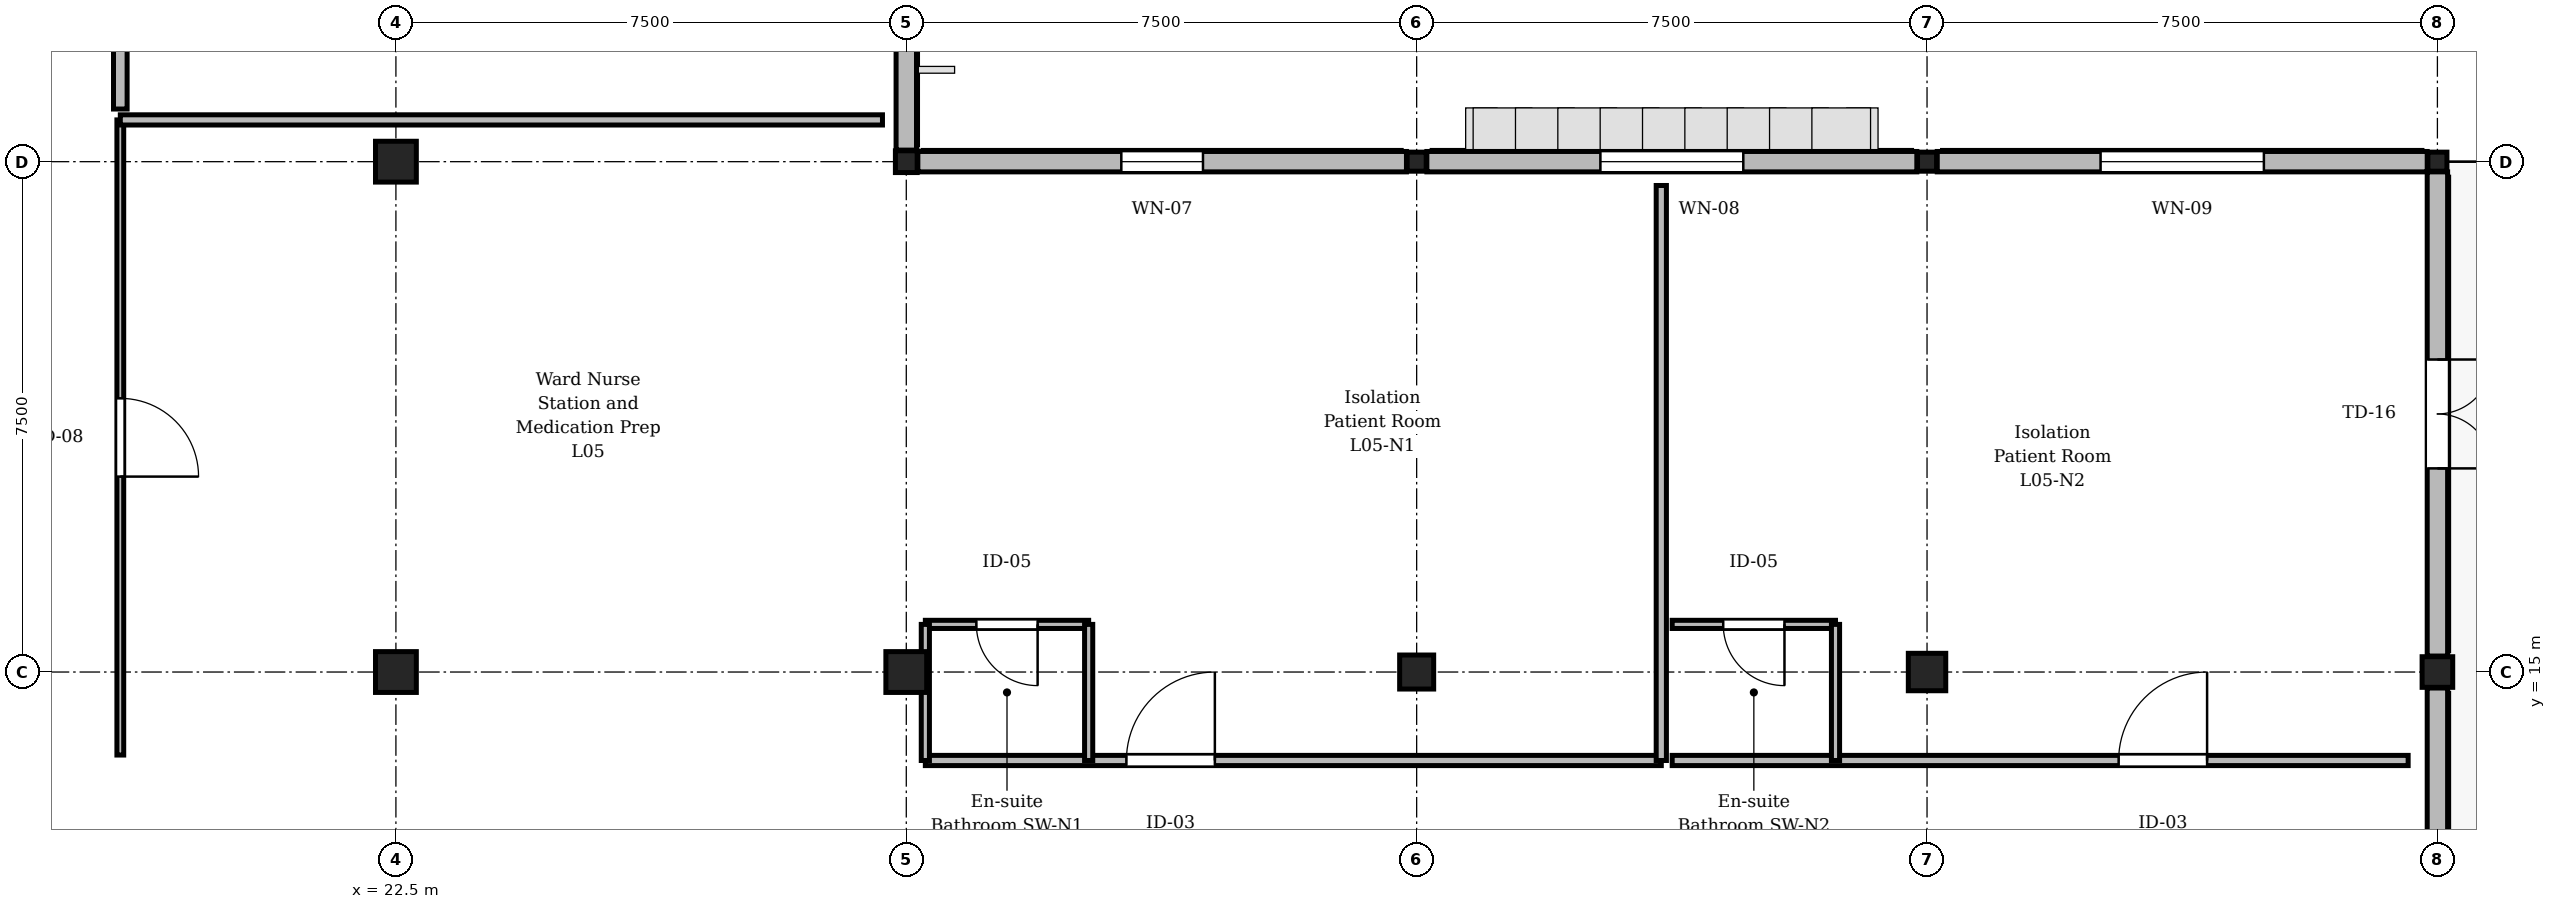
"""IFC4 building model, lengths in metres.
Left out: names, types, materials, properties, quantities, classifications, styles, units other than length and angle.
Written with IfcOpenShell. Run it as: python <this file> out.ifc"""

import sys

from ifc_helpers import new_model, si_unit, direction, frame, frame_2d, origin, origin_2d, place, context, subcontext, project, spatial, rectangle, circle, extrude, element, fill, save


model = new_model("IFC4")
c1 = context("Model", 3, precision=1e-05, world=origin(), true_north=direction((0.0, 1.0)))
c2 = subcontext(c1, "Body", "Model", "MODEL_VIEW")
j1 = project(units=[si_unit("LENGTHUNIT", "METRE"), si_unit("PLANEANGLEUNIT", "RADIAN")], contexts=[c1])
p1 = place(None, origin())
s1 = spatial("IfcSite", under=j1, at=p1, CompositionType="ELEMENT")
p2 = place(p1, origin())
s2 = spatial("IfcBuilding", under=s1, at=p2, CompositionType="ELEMENT")
p3 = place(p2, frame((0.0, 0.0, 21.9)))
s3 = spatial("IfcBuildingStorey", under=s2, at=p3, CompositionType="ELEMENT", Elevation=21.9)
p4 = place(p3, frame((22.5, 15.0, 0.0), z_axis=(0.0, 0.0, 1.0), x_axis=(1.0, 0.0, 0.0)))
e1 = element("IfcColumn", 1, at=p4, inside=s3, PredefinedType="COLUMN", context=c2, shape_type="SweptSolid", body=[
    extrude(rectangle(XDim=0.6, YDim=0.6, at=origin_2d()), origin(), (0.0, 0.0, 1.0), 4.05),
])
for number, where, z_axis, x_axis in (
    (2, (22.5, 22.5, 0.0), (0.0, 0.0, 1.0), (1.0, 0.0, 0.0)),
    (3, (30.0, 15.0, 0.0), (0.0, 0.0, 1.0), (1.0, 0.0, 0.0)),
):
    element("IfcColumn", number, at=place(p3, frame(where, z_axis=z_axis, x_axis=x_axis)), inside=s3, PredefinedType="COLUMN", context=c2, shape_type="SweptSolid", body=[
        extrude(circle(Radius=0.3, at=origin_2d()), origin(), (0.0, 0.0, 1.0), 4.05),
    ])
p5 = place(p3, frame((30.0, 22.5, 0.0), z_axis=(0.0, 0.0, 1.0), x_axis=(1.0, 0.0, 0.0)))
e4 = element("IfcColumn", 4, at=p5, inside=s3, PredefinedType="COLUMN", context=c2, shape_type="SweptSolid", body=[
    extrude(rectangle(XDim=0.32, YDim=0.32, at=origin_2d()), origin(), (0.0, 0.0, 1.0), 4.05),
])
p6 = place(p3, frame((37.5, 15.0, 0.0), z_axis=(0.0, 0.0, 1.0), x_axis=(1.0, 0.0, 0.0)))
e5 = element("IfcColumn", 5, at=p6, inside=s3, PredefinedType="COLUMN", context=c2, shape_type="SweptSolid", body=[
    extrude(rectangle(XDim=0.5, YDim=0.5, at=origin_2d()), origin(), (0.0, 0.0, 1.0), 4.05),
])
p7 = place(p3, frame((37.5, 22.5, 0.0), z_axis=(0.0, 0.0, 1.0), x_axis=(1.0, 0.0, 0.0)))
e6 = element("IfcColumn", 6, at=p7, inside=s3, PredefinedType="COLUMN", context=c2, shape_type="SweptSolid", body=[
    extrude(rectangle(XDim=0.28, YDim=0.28, at=origin_2d()), origin(), (0.0, 0.0, 1.0), 4.05),
])
p8 = place(p3, frame((45.0, 15.0, 0.0), z_axis=(0.0, 0.0, 1.0), x_axis=(1.0, 0.0, 0.0)))
e7 = element("IfcColumn", 7, at=p8, inside=s3, PredefinedType="COLUMN", context=c2, shape_type="SweptSolid", body=[
    extrude(rectangle(XDim=0.55, YDim=0.55, at=origin_2d()), origin(), (0.0, 0.0, 1.0), 4.05),
])
p9 = place(p3, frame((45.0, 22.5, 0.0), z_axis=(0.0, 0.0, 1.0), x_axis=(1.0, 0.0, 0.0)))
e8 = element("IfcColumn", 8, at=p9, inside=s3, PredefinedType="COLUMN", context=c2, shape_type="SweptSolid", body=[
    extrude(rectangle(XDim=0.28, YDim=0.28, at=origin_2d()), origin(), (0.0, 0.0, 1.0), 4.05),
])
p10 = place(p3, frame((52.5, 15.0, 0.0), z_axis=(0.0, 0.0, 1.0), x_axis=(1.0, 0.0, 0.0)))
e9 = element("IfcColumn", 9, at=p10, inside=s3, PredefinedType="COLUMN", context=c2, shape_type="SweptSolid", body=[
    extrude(rectangle(XDim=0.45, YDim=0.45, at=origin_2d()), origin(), (0.0, 0.0, 1.0), 4.05),
])
p11 = place(p3, frame((52.5, 22.5, 0.0), z_axis=(0.0, 0.0, 1.0), x_axis=(1.0, 0.0, 0.0)))
e10 = element("IfcColumn", 10, at=p11, inside=s3, PredefinedType="COLUMN", context=c2, shape_type="SweptSolid", body=[
    extrude(rectangle(XDim=0.28, YDim=0.28, at=origin_2d()), origin(), (0.0, 0.0, 1.0), 4.05),
])
p12 = place(p3, frame((30.0, 31.33, 0.0), z_axis=(0.0, 0.0, 1.0), x_axis=(0.0, -1.0, 0.0)))
e11 = element("IfcWall", 11, at=p12, inside=s3, PredefinedType="STANDARD", context=c2, shape_type="SweptSolid", body=[
    extrude(rectangle(XDim=8.66, YDim=0.3, at=frame_2d((4.33, 0.0))), origin(), (0.0, 0.0, 1.0), 3.22),
])
p13 = place(p12, frame((3.73, 0.0, 0.9)))
e12 = element("IfcOpeningElement", 12, at=p13, cuts=e11, PredefinedType="OPENING", context=c2, shape_type="SweptSolid", body=[
    extrude(rectangle(XDim=1.2, YDim=2.04, at=frame_2d((0.6, 1.02))), frame((0.0, 0.16, 0.0), z_axis=(0.0, -1.0, 0.0), x_axis=(1.0, 0.0, 0.0)), (0.0, 0.0, 1.0), 0.32),
])
p14 = place(p3, frame((30.17, 22.5, 0.0), z_axis=(0.0, 0.0, 1.0), x_axis=(1.0, 0.0, 0.0)))
e13 = element("IfcWall", 13, at=p14, inside=s3, PredefinedType="STANDARD", context=c2, shape_type="SweptSolid", body=[
    extrude(rectangle(XDim=7.18, YDim=0.3, at=frame_2d((3.59, 0.0))), origin(), (0.0, 0.0, 1.0), 3.17),
])
p15 = place(p14, frame((2.99, 0.0, 0.9)))
e14 = element("IfcOpeningElement", 14, at=p15, cuts=e13, PredefinedType="OPENING", context=c2, shape_type="SweptSolid", body=[
    extrude(rectangle(XDim=1.2, YDim=1.99, at=frame_2d((0.6, 0.995))), frame((0.0, 0.16, 0.0), z_axis=(0.0, -1.0, 0.0), x_axis=(1.0, 0.0, 0.0)), (0.0, 0.0, 1.0), 0.32),
])
p16 = place(p3, frame((37.65, 22.5, 0.0), z_axis=(0.0, 0.0, 1.0), x_axis=(1.0, 0.0, 0.0)))
e15 = element("IfcWall", 15, at=p16, inside=s3, PredefinedType="STANDARD", context=c2, shape_type="SweptSolid", body=[
    extrude(rectangle(XDim=7.2, YDim=0.3, at=frame_2d((3.6, 0.0))), origin(), (0.0, 0.0, 1.0), 3.17),
])
p17 = place(p16, frame((2.55, 0.0, 0.9)))
e16 = element("IfcOpeningElement", 16, at=p17, cuts=e15, PredefinedType="OPENING", context=c2, shape_type="SweptSolid", body=[
    extrude(rectangle(XDim=2.1, YDim=1.99, at=frame_2d((1.05, 0.995))), frame((0.0, 0.16, 0.0), z_axis=(0.0, -1.0, 0.0), x_axis=(1.0, 0.0, 0.0)), (0.0, 0.0, 1.0), 0.32),
])
p18 = place(p3, frame((52.5, 14.765, 0.0), z_axis=(0.0, 0.0, 1.0), x_axis=(0.0, -1.0, 0.0)))
e17 = element("IfcWall", 17, at=p18, inside=s3, PredefinedType="STANDARD", context=c2, shape_type="SweptSolid", body=[
    extrude(rectangle(XDim=7.03, YDim=0.3, at=frame_2d((3.515, 0.0))), origin(), (0.0, 0.0, 1.0), 3.17),
])
p19 = place(p18, frame((2.715, 0.0, 0.0)))
e18 = element("IfcOpeningElement", 18, at=p19, cuts=e17, PredefinedType="OPENING", context=c2, shape_type="SweptSolid", body=[
    extrude(rectangle(XDim=1.6, YDim=2.35, at=frame_2d((0.8, 1.175))), frame((0.0, 0.16, 0.0), z_axis=(0.0, -1.0, 0.0), x_axis=(1.0, 0.0, 0.0)), (0.0, 0.0, 1.0), 0.32),
])
p20 = place(p3, frame((45.15, 22.5, 0.0), z_axis=(0.0, 0.0, 1.0), x_axis=(1.0, 0.0, 0.0)))
e19 = element("IfcWall", 19, at=p20, inside=s3, PredefinedType="STANDARD", context=c2, shape_type="SweptSolid", body=[
    extrude(rectangle(XDim=7.2, YDim=0.3, at=frame_2d((3.6, 0.0))), origin(), (0.0, 0.0, 1.0), 3.17),
])
p21 = place(p20, frame((2.4, 0.0, 0.9)))
e20 = element("IfcOpeningElement", 20, at=p21, cuts=e19, PredefinedType="OPENING", context=c2, shape_type="SweptSolid", body=[
    extrude(rectangle(XDim=2.4, YDim=1.99, at=frame_2d((1.2, 0.995))), frame((0.0, 0.16, 0.0), z_axis=(0.0, -1.0, 0.0), x_axis=(1.0, 0.0, 0.0)), (0.0, 0.0, 1.0), 0.32),
])
p22 = place(p3, frame((52.5, 22.35, 0.0), z_axis=(0.0, 0.0, 1.0), x_axis=(0.0, -1.0, 0.0)))
e21 = element("IfcWall", 21, at=p22, inside=s3, PredefinedType="STANDARD", context=c2, shape_type="SweptSolid", body=[
    extrude(rectangle(XDim=7.115, YDim=0.3, at=frame_2d((3.558, 0.0))), origin(), (0.0, 0.0, 1.0), 3.17),
])
p23 = place(p22, frame((2.758, 0.0, 0.0)))
e22 = element("IfcOpeningElement", 22, at=p23, cuts=e21, PredefinedType="OPENING", context=c2, shape_type="SweptSolid", body=[
    extrude(rectangle(XDim=1.6, YDim=2.35, at=frame_2d((0.8, 1.175))), frame((0.0, 0.16, 0.0), z_axis=(0.0, -1.0, 0.0), x_axis=(1.0, 0.0, 0.0)), (0.0, 0.0, 1.0), 0.32),
])
p24 = place(p3, frame((18.45, 23.114, 0.0), z_axis=(0.0, 0.0, 1.0), x_axis=(0.0, -1.0, 0.0)))
e23 = element("IfcWall", 23, at=p24, inside=s3, PredefinedType="PARTITIONING", context=c2, shape_type="SweptSolid", body=[
    extrude(rectangle(XDim=9.334, YDim=0.1, at=frame_2d((4.667, 0.0))), origin(), (0.0, 0.0, 1.0), 3.355),
])
p25 = place(p24, frame((4.092, 0.0, 0.0)))
e24 = element("IfcOpeningElement", 24, at=p25, cuts=e23, PredefinedType="OPENING", context=c2, shape_type="SweptSolid", body=[
    extrude(rectangle(XDim=1.15, YDim=2.2, at=frame_2d((0.575, 1.1))), frame((0.0, 0.06, 0.0), z_axis=(0.0, -1.0, 0.0), x_axis=(1.0, 0.0, 0.0)), (0.0, 0.0, 1.0), 0.12),
])
p26 = place(p3, frame((18.45, 32.607, 0.0), z_axis=(0.0, 0.0, 1.0), x_axis=(0.0, -1.0, 0.0)))
e25 = element("IfcWall", 25, at=p26, inside=s3, PredefinedType="STANDARD", context=c2, shape_type="SweptSolid", body=[
    extrude(rectangle(XDim=9.334, YDim=0.2, at=frame_2d((4.667, 0.0))), origin(), (0.0, 0.0, 1.0), 3.355),
])
p27 = place(p26, frame((4.86, 0.0, 0.0)))
e26 = element("IfcOpeningElement", 26, at=p27, cuts=e25, PredefinedType="OPENING", context=c2, shape_type="SweptSolid", body=[
    extrude(rectangle(XDim=1.15, YDim=2.2, at=frame_2d((0.575, 1.1))), frame((0.0, 0.11, 0.0), z_axis=(0.0, -1.0, 0.0), x_axis=(1.0, 0.0, 0.0)), (0.0, 0.0, 1.0), 0.22),
])
p28 = place(p3, frame((30.28, 13.7, 0.0), z_axis=(0.0, 0.0, 1.0), x_axis=(1.0, 0.0, 0.0)))
e27 = element("IfcWall", 27, at=p28, inside=s3, PredefinedType="PARTITIONING", context=c2, shape_type="SweptSolid", body=[
    extrude(rectangle(XDim=10.815, YDim=0.15, at=frame_2d((5.407, 0.0))), origin(), (0.0, 0.0, 1.0), 3.755),
])
p29 = place(p28, frame((2.955, 0.0, 0.0)))
e28 = element("IfcOpeningElement", 28, at=p29, cuts=e27, PredefinedType="OPENING", context=c2, shape_type="SweptSolid", body=[
    extrude(rectangle(XDim=1.3, YDim=2.2, at=frame_2d((0.65, 1.1))), frame((0.0, 0.085, 0.0), z_axis=(0.0, -1.0, 0.0), x_axis=(1.0, 0.0, 0.0)), (0.0, 0.0, 1.0), 0.17),
])
p30 = place(p3, frame((32.68, 15.7, 0.0), z_axis=(0.0, 0.0, 1.0), x_axis=(-1.0, 0.0, 0.0)))
e29 = element("IfcWall", 29, at=p30, inside=s3, PredefinedType="PARTITIONING", context=c2, shape_type="SweptSolid", body=[
    extrude(rectangle(XDim=2.4, YDim=0.12, at=frame_2d((1.2, 0.0))), origin(), (0.0, 0.0, 1.0), 3.755),
])
p31 = place(p30, frame((0.75, 0.0, 0.0)))
e30 = element("IfcOpeningElement", 30, at=p31, cuts=e29, PredefinedType="OPENING", context=c2, shape_type="SweptSolid", body=[
    extrude(rectangle(XDim=0.9, YDim=2.1, at=frame_2d((0.45, 1.05))), frame((0.0, 0.07, 0.0), z_axis=(0.0, -1.0, 0.0), x_axis=(1.0, 0.0, 0.0)), (0.0, 0.0, 1.0), 0.14),
])
p32 = place(p3, frame((32.68, 13.7, 0.0), z_axis=(0.0, 0.0, 1.0), x_axis=(0.0, 1.0, 0.0)))
e31 = element("IfcWall", 31, at=p32, inside=s3, PredefinedType="PARTITIONING", context=c2, shape_type="SweptSolid", body=[
    extrude(rectangle(XDim=2.0, YDim=0.12, at=frame_2d((1.0, 0.0))), origin(), (0.0, 0.0, 1.0), 3.755),
])
p33 = place(p3, frame((41.255, 13.7, 0.0), z_axis=(0.0, 0.0, 1.0), x_axis=(1.0, 0.0, 0.0)))
e32 = element("IfcWall", 32, at=p33, inside=s3, PredefinedType="PARTITIONING", context=c2, shape_type="SweptSolid", body=[
    extrude(rectangle(XDim=10.815, YDim=0.15, at=frame_2d((5.408, 0.0))), origin(), (0.0, 0.0, 1.0), 3.755),
])
p34 = place(p33, frame((6.561, 0.0, 0.0)))
e33 = element("IfcOpeningElement", 33, at=p34, cuts=e32, PredefinedType="OPENING", context=c2, shape_type="SweptSolid", body=[
    extrude(rectangle(XDim=1.3, YDim=2.2, at=frame_2d((0.65, 1.1))), frame((0.0, 0.085, 0.0), z_axis=(0.0, -1.0, 0.0), x_axis=(1.0, 0.0, 0.0)), (0.0, 0.0, 1.0), 0.17),
])
p35 = place(p3, frame((43.655, 15.7, 0.0), z_axis=(0.0, 0.0, 1.0), x_axis=(-1.0, 0.0, 0.0)))
e34 = element("IfcWall", 34, at=p35, inside=s3, PredefinedType="PARTITIONING", context=c2, shape_type="SweptSolid", body=[
    extrude(rectangle(XDim=2.4, YDim=0.12, at=frame_2d((1.2, 0.0))), origin(), (0.0, 0.0, 1.0), 3.755),
])
p36 = place(p35, frame((0.75, 0.0, 0.0)))
e35 = element("IfcOpeningElement", 35, at=p36, cuts=e34, PredefinedType="OPENING", context=c2, shape_type="SweptSolid", body=[
    extrude(rectangle(XDim=0.9, YDim=2.1, at=frame_2d((0.45, 1.05))), frame((0.0, 0.07, 0.0), z_axis=(0.0, -1.0, 0.0), x_axis=(1.0, 0.0, 0.0)), (0.0, 0.0, 1.0), 0.14),
])
p37 = place(p3, frame((43.655, 13.7, 0.0), z_axis=(0.0, 0.0, 1.0), x_axis=(0.0, 1.0, 0.0)))
e36 = element("IfcWall", 36, at=p37, inside=s3, PredefinedType="PARTITIONING", context=c2, shape_type="SweptSolid", body=[
    extrude(rectangle(XDim=2.0, YDim=0.12, at=frame_2d((1.0, 0.0))), origin(), (0.0, 0.0, 1.0), 3.755),
])
p38 = place(p3, frame((18.45, 23.114, 0.0), z_axis=(0.0, 0.0, 1.0), x_axis=(1.0, 0.0, 0.0)))
e37 = element("IfcWall", 37, at=p38, inside=s3, PredefinedType="PARTITIONING", context=c2, shape_type="SweptSolid", body=[
    extrude(rectangle(XDim=11.2, YDim=0.15, at=frame_2d((5.6, 0.0))), origin(), (0.0, 0.0, 1.0), 3.755),
])
p39 = place(p3, frame((41.095, 13.7, 0.0), z_axis=(0.0, 0.0, 1.0), x_axis=(0.0, 1.0, 0.0)))
e38 = element("IfcWall", 38, at=p39, inside=s3, PredefinedType="PARTITIONING", context=c2, shape_type="SweptSolid", body=[
    extrude(rectangle(XDim=8.45, YDim=0.15, at=frame_2d((4.225, 0.0))), origin(), (0.0, 0.0, 1.0), 3.755),
])
p40 = place(p3, frame((30.28, 13.7, 0.0), z_axis=(0.0, 0.0, 1.0), x_axis=(0.0, 1.0, 0.0)))
e39 = element("IfcWall", 39, at=p40, inside=s3, PredefinedType="PARTITIONING", context=c2, shape_type="SweptSolid", body=[
    extrude(rectangle(XDim=2.0, YDim=0.12, at=frame_2d((1.0, 0.0))), origin(), (0.0, 0.0, 1.0), 3.205),
])
p41 = place(p15, origin())
e40 = element("IfcWindow", 40, at=p41, inside=s3, PartitioningType="SINGLE_PANEL", PredefinedType="WINDOW", context=c2, shape_type="SweptSolid", body=[
    extrude(rectangle(XDim=1.2, YDim=1.99, at=frame_2d((0.6, 0.995))), frame((0.0, 0.03, 0.0), z_axis=(0.0, -1.0, 0.0), x_axis=(1.0, 0.0, 0.0)), (0.0, 0.0, 1.0), 0.06),
])
fill(e14, e40)
p42 = place(p17, origin())
e41 = element("IfcWindow", 41, at=p42, inside=s3, PartitioningType="SINGLE_PANEL", PredefinedType="WINDOW", context=c2, shape_type="SweptSolid", body=[
    extrude(rectangle(XDim=2.1, YDim=1.99, at=frame_2d((1.05, 0.995))), frame((0.0, 0.03, 0.0), z_axis=(0.0, -1.0, 0.0), x_axis=(1.0, 0.0, 0.0)), (0.0, 0.0, 1.0), 0.06),
])
fill(e16, e41)
p43 = place(p21, origin())
e42 = element("IfcWindow", 42, at=p43, inside=s3, PartitioningType="SINGLE_PANEL", PredefinedType="WINDOW", context=c2, shape_type="SweptSolid", body=[
    extrude(rectangle(XDim=2.4, YDim=1.99, at=frame_2d((1.2, 0.995))), frame((0.0, 0.03, 0.0), z_axis=(0.0, -1.0, 0.0), x_axis=(1.0, 0.0, 0.0)), (0.0, 0.0, 1.0), 0.06),
])
fill(e20, e42)
p44 = place(p23, origin())
e43 = element("IfcDoor", 43, at=p44, inside=s3, OperationType="DOUBLE_DOOR_SINGLE_SWING", PredefinedType="DOOR", context=c2, shape_type="SweptSolid", body=[
    extrude(rectangle(XDim=1.6, YDim=2.35, at=frame_2d((0.8, 1.175))), frame((0.0, 0.025, 0.0), z_axis=(0.0, -1.0, 0.0), x_axis=(1.0, 0.0, 0.0)), (0.0, 0.0, 1.0), 0.05),
])
fill(e22, e43)
p45 = place(p25, origin())
e44 = element("IfcDoor", 44, at=p45, inside=s3, OperationType="SINGLE_SWING_RIGHT", PredefinedType="DOOR", context=c2, shape_type="SweptSolid", body=[
    extrude(rectangle(XDim=1.15, YDim=2.2, at=frame_2d((0.575, 1.1))), frame((0.0, 0.025, 0.0), z_axis=(0.0, -1.0, 0.0), x_axis=(1.0, 0.0, 0.0)), (0.0, 0.0, 1.0), 0.05),
])
fill(e24, e44)
p46 = place(p29, origin())
e45 = element("IfcDoor", 45, at=p46, inside=s3, OperationType="SINGLE_SWING_RIGHT", PredefinedType="DOOR", context=c2, shape_type="SweptSolid", body=[
    extrude(rectangle(XDim=1.3, YDim=2.2, at=frame_2d((0.65, 1.1))), frame((0.0, 0.025, 0.0), z_axis=(0.0, -1.0, 0.0), x_axis=(1.0, 0.0, 0.0)), (0.0, 0.0, 1.0), 0.05),
])
fill(e28, e45)
p47 = place(p31, origin())
e46 = element("IfcDoor", 46, at=p47, inside=s3, OperationType="SINGLE_SWING_LEFT", PredefinedType="DOOR", context=c2, shape_type="SweptSolid", body=[
    extrude(rectangle(XDim=0.9, YDim=2.1, at=frame_2d((0.45, 1.05))), frame((0.0, 0.025, 0.0), z_axis=(0.0, -1.0, 0.0), x_axis=(1.0, 0.0, 0.0)), (0.0, 0.0, 1.0), 0.05),
])
fill(e30, e46)
p48 = place(p34, origin())
e47 = element("IfcDoor", 47, at=p48, inside=s3, OperationType="SINGLE_SWING_RIGHT", PredefinedType="DOOR", context=c2, shape_type="SweptSolid", body=[
    extrude(rectangle(XDim=1.3, YDim=2.2, at=frame_2d((0.65, 1.1))), frame((0.0, 0.025, 0.0), z_axis=(0.0, -1.0, 0.0), x_axis=(1.0, 0.0, 0.0)), (0.0, 0.0, 1.0), 0.05),
])
fill(e33, e47)
p49 = place(p36, origin())
e48 = element("IfcDoor", 48, at=p49, inside=s3, OperationType="SINGLE_SWING_LEFT", PredefinedType="DOOR", context=c2, shape_type="SweptSolid", body=[
    extrude(rectangle(XDim=0.9, YDim=2.1, at=frame_2d((0.45, 1.05))), frame((0.0, 0.025, 0.0), z_axis=(0.0, -1.0, 0.0), x_axis=(1.0, 0.0, 0.0)), (0.0, 0.0, 1.0), 0.05),
])
fill(e35, e48)
save(model, sys.argv[1])
